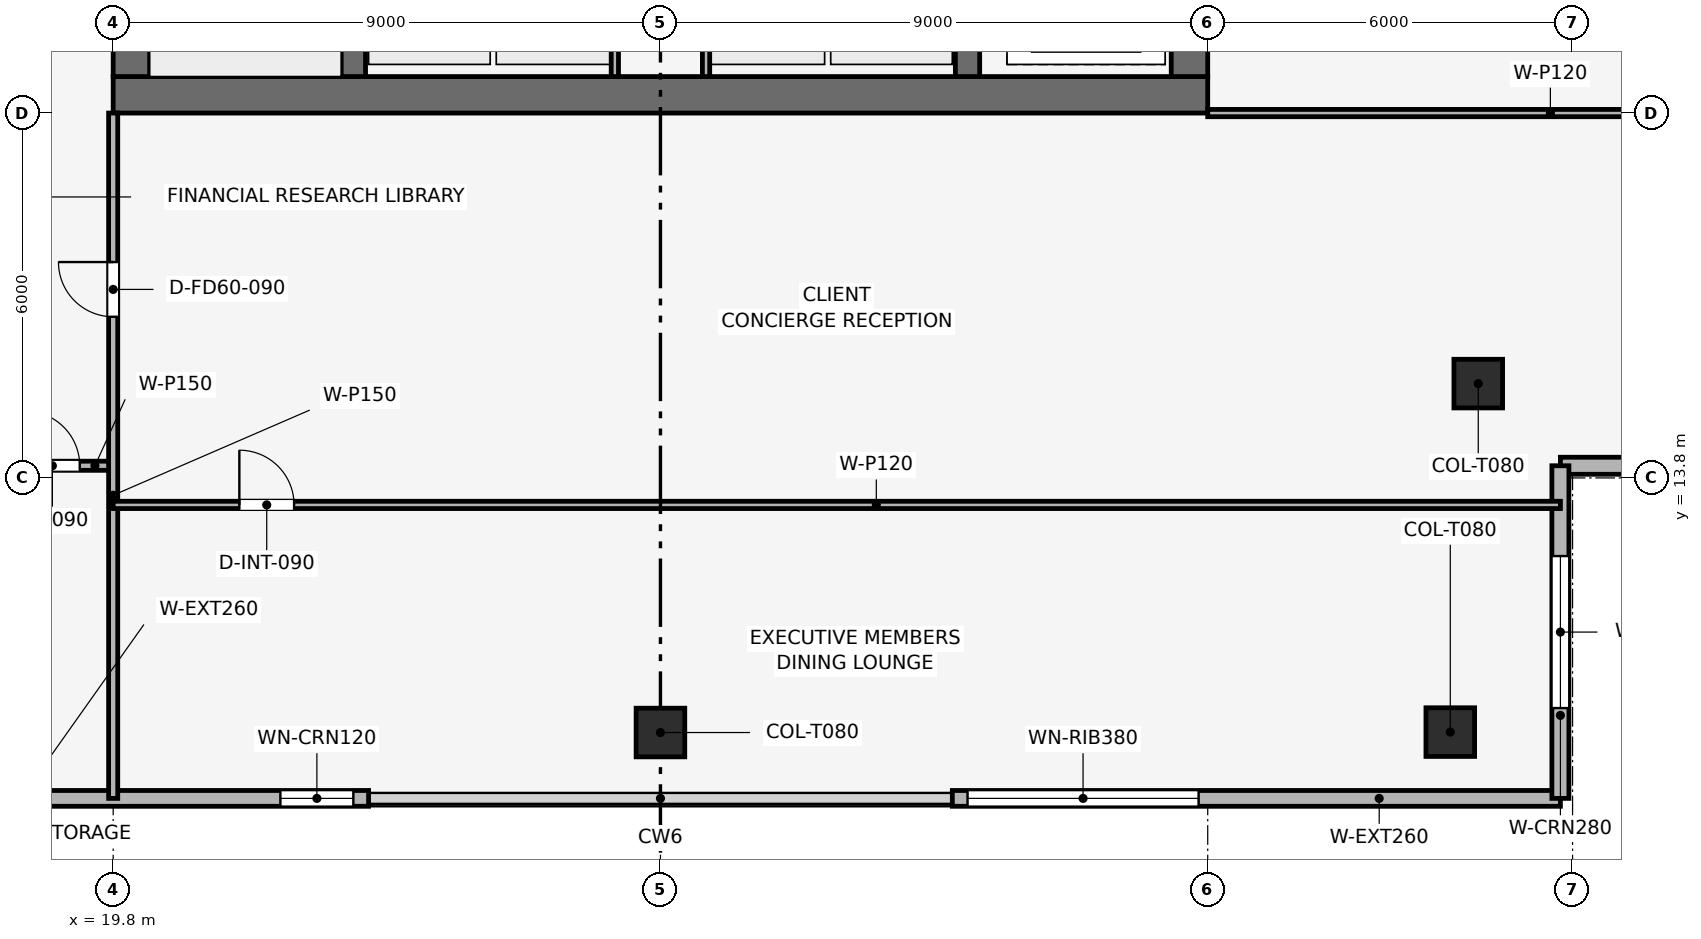
"""IFC4 building model, lengths in metres.
Left out: names, types, materials, properties, quantities, classifications, styles, units other than length and angle.
Written with IfcOpenShell. Run it as: python <this file> out.ifc"""

import sys

from ifc_helpers import new_model, si_unit, direction, frame, frame_2d, origin, origin_2d, place, context, subcontext, project, spatial, rectangle, extrude, element, fill, save


model = new_model("IFC4")
c1 = context("Model", 3, precision=1e-05, world=origin(), true_north=direction((0.0, 1.0)))
c2 = subcontext(c1, "Body", "Model", "MODEL_VIEW")
j1 = project(units=[si_unit("LENGTHUNIT", "METRE"), si_unit("PLANEANGLEUNIT", "RADIAN")], contexts=[c1])
p1 = place(None, origin())
s1 = spatial("IfcSite", under=j1, at=p1, CompositionType="ELEMENT")
p2 = place(p1, origin())
s2 = spatial("IfcBuilding", under=s1, at=p2, CompositionType="ELEMENT")
p3 = place(p2, frame((0.0, 0.0, 364.5)))
s3 = spatial("IfcBuildingStorey", under=s2, at=p3, CompositionType="ELEMENT", Elevation=364.5)
p4 = place(p3, frame((19.8, 20.1, 0.0), z_axis=(0.0, 0.0, 1.0), x_axis=(1.0, 0.0, 0.0)))
e1 = element("IfcWall", 1, at=p4, inside=s3, PredefinedType="SHEAR", context=c2, shape_type="SweptSolid", body=[
    extrude(rectangle(XDim=18.0, YDim=0.6, at=frame_2d((9.0, 0.0))), origin(), (0.0, 0.0, 1.0), 4.5),
])
p5 = place(p3, frame((20.1, 20.4, 0.0), z_axis=(0.0, 0.0, 1.0), x_axis=(0.0, 1.0, 0.0)))
e2 = element("IfcWall", 2, at=p5, inside=s3, PredefinedType="SHEAR", context=c2, shape_type="SweptSolid", body=[
    extrude(rectangle(XDim=16.8, YDim=0.6, at=frame_2d((8.4, 0.0))), origin(), (0.0, 0.0, 1.0), 4.5),
])
p6 = place(p5, frame((10.4, 0.0, 0.0)))
e3 = element("IfcOpeningElement", 3, at=p6, cuts=e2, PredefinedType="OPENING", context=c2, shape_type="SweptSolid", body=[
    extrude(rectangle(XDim=1.1, YDim=2.15, at=frame_2d((0.55, 1.075))), frame((0.0, 0.31, 0.0), z_axis=(0.0, -1.0, 0.0), x_axis=(1.0, 0.0, 0.0)), (0.0, 0.0, 1.0), 0.62),
])
p7 = place(p3, frame((37.5, 20.4, 0.0), z_axis=(0.0, 0.0, 1.0), x_axis=(0.0, 1.0, 0.0)))
e4 = element("IfcWall", 4, at=p7, inside=s3, PredefinedType="SHEAR", context=c2, shape_type="SweptSolid", body=[
    extrude(rectangle(XDim=16.8, YDim=0.6, at=frame_2d((8.4, 0.0))), origin(), (0.0, 0.0, 1.0), 4.5),
])
p8 = place(p7, frame((4.9, 0.0, 0.0)))
e5 = element("IfcOpeningElement", 5, at=p8, cuts=e4, PredefinedType="OPENING", context=c2, shape_type="SweptSolid", body=[
    extrude(rectangle(XDim=1.1, YDim=2.15, at=frame_2d((0.55, 1.075))), frame((0.0, 0.31, 0.0), z_axis=(0.0, -1.0, 0.0), x_axis=(1.0, 0.0, 0.0)), (0.0, 0.0, 1.0), 0.62),
])
for number, where, z_axis, x_axis in (
    (6, (23.75, 20.4, 0.0), (0.0, 0.0, 1.0), (0.0, 1.0, 0.0)),
    (7, (33.85, 20.4, 0.0), (0.0, 0.0, 1.0), (0.0, 1.0, 0.0)),
):
    element("IfcWall", number, at=place(p3, frame(where, z_axis=z_axis, x_axis=x_axis)), inside=s3, PredefinedType="SHEAR", context=c2, shape_type="SweptSolid", body=[
        extrude(rectangle(XDim=16.8, YDim=0.4, at=frame_2d((8.4, 0.0))), origin(), (0.0, 0.0, 1.0), 4.5),
    ])
p9 = place(p3, frame((28.8, 9.613, 0.033), z_axis=(0.0, 0.371428235787, 0.928461666231), x_axis=(-1.0, 0.0, 0.0)))
e8 = element("IfcColumn", 8, at=p9, inside=s3, PredefinedType="COLUMN", context=c2, shape_type="SweptSolid", body=[
    extrude(rectangle(XDim=0.8, YDim=0.8, at=origin_2d()), origin(), (0.0, 0.0, 1.0), 4.483),
])
p10 = place(p3, frame((41.789, 9.62, 0.051), z_axis=(-0.202047238794, 0.363749581663, 0.909320160964), x_axis=(-0.874193862425, -0.485577069989, 0.0)))
e9 = element("IfcColumn", 9, at=p10, inside=s3, PredefinedType="COLUMN", context=c2, shape_type="SweptSolid", body=[
    extrude(rectangle(XDim=0.8, YDim=0.8, at=origin_2d()), origin(), (0.0, 0.0, 1.0), 4.539),
])
p11 = place(p3, frame((42.249, 15.351, 0.005), z_axis=(-0.212114432299, 0.212058875874, 0.953959381092), x_axis=(-0.707014161267, -0.707199388975, 0.0)))
e10 = element("IfcColumn", 10, at=p11, inside=s3, PredefinedType="COLUMN", context=c2, shape_type="SweptSolid", body=[
    extrude(rectangle(XDim=0.8, YDim=0.8, at=origin_2d()), origin(), (0.0, 0.0, 1.0), 4.395),
])
p12 = place(p3, frame((43.6, 8.53, 0.0), z_axis=(0.0, 0.0, 1.0), x_axis=(-1.0, 0.0, 0.0)))
e11 = element("IfcWall", 11, at=p12, inside=s3, PredefinedType="SOLIDWALL", context=c2, shape_type="SweptSolid", body=[
    extrude(rectangle(XDim=10.0, YDim=0.26, at=frame_2d((5.0, 0.0))), origin(), (0.0, 0.0, 1.0), 4.2),
])
p13 = place(p12, frame((5.95, 0.0, 0.9)))
e12 = element("IfcOpeningElement", 12, at=p13, cuts=e11, PredefinedType="OPENING", context=c2, shape_type="SweptSolid", body=[
    extrude(rectangle(XDim=3.8, YDim=1.9, at=frame_2d((1.9, 0.95))), frame((0.0, 0.14, 0.0), z_axis=(0.0, -1.0, 0.0), x_axis=(1.0, 0.0, 0.0)), (0.0, 0.0, 1.0), 0.28),
])
p14 = place(p3, frame((24.0, 8.53, 0.0), z_axis=(0.0, 0.0, 1.0), x_axis=(-1.0, 0.0, 0.0)))
e13 = element("IfcWall", 13, at=p14, inside=s3, PredefinedType="SOLIDWALL", context=c2, shape_type="SweptSolid", body=[
    extrude(rectangle(XDim=10.0, YDim=0.26, at=frame_2d((5.0, 0.0))), origin(), (0.0, 0.0, 1.0), 4.2),
])
p15 = place(p14, frame((0.25, 0.0, 0.9)))
e14 = element("IfcOpeningElement", 14, at=p15, cuts=e13, PredefinedType="OPENING", context=c2, shape_type="SweptSolid", body=[
    extrude(rectangle(XDim=1.2, YDim=2.1, at=frame_2d((0.6, 1.05))), frame((0.0, 0.14, 0.0), z_axis=(0.0, -1.0, 0.0), x_axis=(1.0, 0.0, 0.0)), (0.0, 0.0, 1.0), 0.28),
])
p16 = place(p3, frame((49.07, 14.0, 0.0), z_axis=(0.0, 0.0, 1.0), x_axis=(-1.0, 0.0, 0.0)))
e15 = element("IfcWall", 15, at=p16, inside=s3, PredefinedType="SOLIDWALL", context=c2, shape_type="SweptSolid", body=[
    extrude(rectangle(XDim=5.47, YDim=0.28, at=frame_2d((2.735, 0.0))), origin(), (0.0, 0.0, 1.0), 4.2),
])
p17 = place(p16, frame((1.485, 0.0, 0.9)))
e16 = element("IfcOpeningElement", 16, at=p17, cuts=e15, PredefinedType="OPENING", context=c2, shape_type="SweptSolid", body=[
    extrude(rectangle(XDim=2.5, YDim=1.9, at=frame_2d((1.25, 0.95))), frame((0.0, 0.15, 0.0), z_axis=(0.0, -1.0, 0.0), x_axis=(1.0, 0.0, 0.0)), (0.0, 0.0, 1.0), 0.3),
])
p18 = place(p3, frame((43.6, 14.0, 0.0), z_axis=(0.0, 0.0, 1.0), x_axis=(0.0, -1.0, 0.0)))
e17 = element("IfcWall", 17, at=p18, inside=s3, PredefinedType="SOLIDWALL", context=c2, shape_type="SweptSolid", body=[
    extrude(rectangle(XDim=5.47, YDim=0.28, at=frame_2d((2.735, 0.0))), origin(), (0.0, 0.0, 1.0), 4.2),
])
p19 = place(p18, frame((1.485, 0.0, 0.9)))
e18 = element("IfcOpeningElement", 18, at=p19, cuts=e17, PredefinedType="OPENING", context=c2, shape_type="SweptSolid", body=[
    extrude(rectangle(XDim=2.5, YDim=1.9, at=frame_2d((1.25, 0.95))), frame((0.0, 0.15, 0.0), z_axis=(0.0, -1.0, 0.0), x_axis=(1.0, 0.0, 0.0)), (0.0, 0.0, 1.0), 0.3),
])
for number, where, z_axis, x_axis in (
    (19, (28.05, 20.4, 0.0), (0.0, 0.0, 1.0), (0.0, 1.0, 0.0)),
    (20, (29.55, 20.4, 0.0), (0.0, 0.0, 1.0), (0.0, 1.0, 0.0)),
):
    element("IfcWall", number, at=place(p3, frame(where, z_axis=z_axis, x_axis=x_axis)), inside=s3, PredefinedType="PARTITIONING", context=c2, shape_type="SweptSolid", body=[
        extrude(rectangle(XDim=8.15, YDim=0.12, at=frame_2d((4.075, 0.0))), origin(), (0.0, 0.0, 1.0), 4.2),
    ])
p20 = place(p3, frame((17.9, 14.0, 0.0), z_axis=(0.0, 0.0, 1.0), x_axis=(1.0, 0.0, 0.0)))
e21 = element("IfcWall", 21, at=p20, inside=s3, PredefinedType="PARTITIONING", context=c2, shape_type="SweptSolid", body=[
    extrude(rectangle(XDim=1.9, YDim=0.15, at=frame_2d((0.95, 0.0))), origin(), (0.0, 0.0, 1.0), 4.2),
])
p21 = place(p20, frame((0.45, 0.0, 0.0)))
e22 = element("IfcOpeningElement", 22, at=p21, cuts=e21, PredefinedType="OPENING", context=c2, shape_type="SweptSolid", body=[
    extrude(rectangle(XDim=0.9, YDim=2.1, at=frame_2d((0.45, 1.05))), frame((0.0, 0.085, 0.0), z_axis=(0.0, -1.0, 0.0), x_axis=(1.0, 0.0, 0.0)), (0.0, 0.0, 1.0), 0.17),
])
p22 = place(p3, frame((19.8, 8.53, 0.0), z_axis=(0.0, 0.0, 1.0), x_axis=(0.0, 1.0, 0.0)))
e23 = element("IfcWall", 23, at=p22, inside=s3, PredefinedType="PARTITIONING", context=c2, shape_type="SweptSolid", body=[
    extrude(rectangle(XDim=11.27, YDim=0.15, at=frame_2d((5.635, 0.0))), origin(), (0.0, 0.0, 1.0), 3.785),
])
p23 = place(p22, frame((7.92, 0.0, 0.0)))
e24 = element("IfcOpeningElement", 24, at=p23, cuts=e23, PredefinedType="OPENING", context=c2, shape_type="SweptSolid", body=[
    extrude(rectangle(XDim=0.9, YDim=2.1, at=frame_2d((0.45, 1.05))), frame((0.0, 0.085, 0.0), z_axis=(0.0, -1.0, 0.0), x_axis=(1.0, 0.0, 0.0)), (0.0, 0.0, 1.0), 0.17),
])
p24 = place(p3, frame((19.8, 13.356, 0.0), z_axis=(0.0, 0.0, 1.0), x_axis=(1.0, 0.0, 0.0)))
e25 = element("IfcWall", 25, at=p24, inside=s3, PredefinedType="PARTITIONING", context=c2, shape_type="SweptSolid", body=[
    extrude(rectangle(XDim=23.8, YDim=0.12, at=frame_2d((11.9, 0.0))), origin(), (0.0, 0.0, 1.0), 3.285),
])
p25 = place(p24, frame((2.075, 0.0, 0.0)))
e26 = element("IfcOpeningElement", 26, at=p25, cuts=e25, PredefinedType="OPENING", context=c2, shape_type="SweptSolid", body=[
    extrude(rectangle(XDim=0.9, YDim=2.1, at=frame_2d((0.45, 1.05))), frame((0.0, 0.07, 0.0), z_axis=(0.0, -1.0, 0.0), x_axis=(1.0, 0.0, 0.0)), (0.0, 0.0, 1.0), 0.14),
])
p26 = place(p3, frame((37.8, 19.8, 0.0), z_axis=(0.0, 0.0, 1.0), x_axis=(1.0, 0.0, 0.0)))
e27 = element("IfcWall", 27, at=p26, inside=s3, PredefinedType="PARTITIONING", context=c2, shape_type="SweptSolid", body=[
    extrude(rectangle(XDim=11.27, YDim=0.12, at=frame_2d((5.635, 0.0))), origin(), (0.0, 0.0, 1.0), 3.785),
])
p27 = place(p13, origin())
e28 = element("IfcWindow", 28, at=p27, inside=s3, PartitioningType="SINGLE_PANEL", PredefinedType="WINDOW", context=c2, shape_type="SweptSolid", body=[
    extrude(rectangle(XDim=3.8, YDim=1.9, at=frame_2d((1.9, 0.95))), frame((0.0, 0.03, 0.0), z_axis=(0.0, -1.0, 0.0), x_axis=(1.0, 0.0, 0.0)), (0.0, 0.0, 1.0), 0.06),
])
fill(e12, e28)
p28 = place(p15, origin())
e29 = element("IfcWindow", 29, at=p28, inside=s3, PartitioningType="SINGLE_PANEL", PredefinedType="WINDOW", context=c2, shape_type="SweptSolid", body=[
    extrude(rectangle(XDim=1.2, YDim=2.1, at=frame_2d((0.6, 1.05))), frame((0.0, 0.03, 0.0), z_axis=(0.0, -1.0, 0.0), x_axis=(1.0, 0.0, 0.0)), (0.0, 0.0, 1.0), 0.06),
])
fill(e14, e29)
p29 = place(p19, origin())
e30 = element("IfcWindow", 30, at=p29, inside=s3, PartitioningType="SINGLE_PANEL", PredefinedType="WINDOW", context=c2, shape_type="SweptSolid", body=[
    extrude(rectangle(XDim=2.5, YDim=1.9, at=frame_2d((1.25, 0.95))), frame((0.0, 0.03, 0.0), z_axis=(0.0, -1.0, 0.0), x_axis=(1.0, 0.0, 0.0)), (0.0, 0.0, 1.0), 0.06),
])
fill(e18, e30)
p30 = place(p21, origin())
e31 = element("IfcDoor", 31, at=p30, inside=s3, OperationType="SINGLE_SWING_LEFT", PredefinedType="DOOR", context=c2, shape_type="SweptSolid", body=[
    extrude(rectangle(XDim=0.9, YDim=2.1, at=frame_2d((0.45, 1.05))), frame((0.0, 0.025, 0.0), z_axis=(0.0, -1.0, 0.0), x_axis=(1.0, 0.0, 0.0)), (0.0, 0.0, 1.0), 0.05),
])
fill(e22, e31)
p31 = place(p23, origin())
e32 = element("IfcDoor", 32, at=p31, inside=s3, OperationType="SINGLE_SWING_RIGHT", PredefinedType="DOOR", context=c2, shape_type="SweptSolid", body=[
    extrude(rectangle(XDim=0.9, YDim=2.1, at=frame_2d((0.45, 1.05))), frame((0.0, 0.025, 0.0), z_axis=(0.0, -1.0, 0.0), x_axis=(1.0, 0.0, 0.0)), (0.0, 0.0, 1.0), 0.05),
])
fill(e24, e32)
p32 = place(p25, origin())
e33 = element("IfcDoor", 33, at=p32, inside=s3, OperationType="SINGLE_SWING_LEFT", PredefinedType="DOOR", context=c2, shape_type="SweptSolid", body=[
    extrude(rectangle(XDim=0.9, YDim=2.1, at=frame_2d((0.45, 1.05))), frame((0.0, 0.025, 0.0), z_axis=(0.0, -1.0, 0.0), x_axis=(1.0, 0.0, 0.0)), (0.0, 0.0, 1.0), 0.05),
])
fill(e26, e33)
save(model, sys.argv[1])
